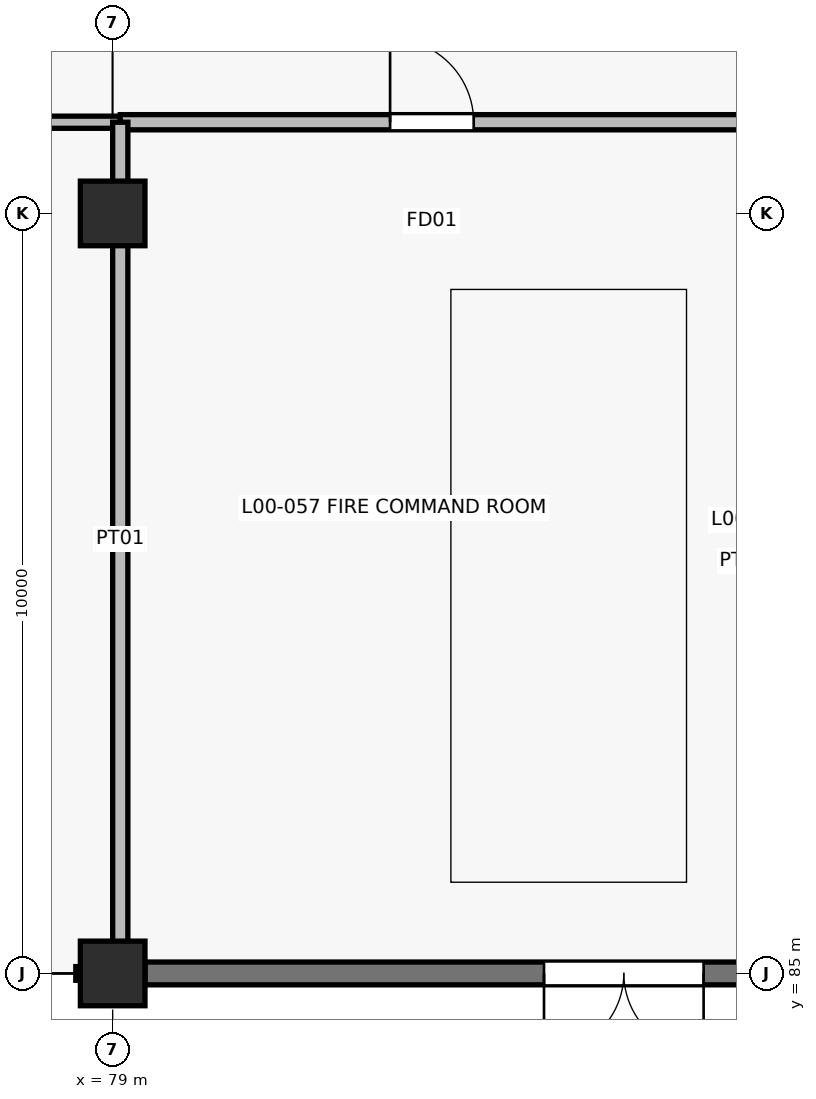
"""IFC4 building model, lengths in metres.
Left out: names, types, materials, properties, quantities, classifications, styles, units other than length and angle.
Written with IfcOpenShell. Run it as: python <this file> out.ifc"""

import sys

from ifc_helpers import new_model, si_unit, direction, frame, frame_2d, origin, origin_2d, place, context, subcontext, project, spatial, rectangle, extrude, element, fill, save


model = new_model("IFC4")
c1 = context("Model", 3, precision=1e-05, world=origin(), true_north=direction((0.0, 1.0)))
c2 = subcontext(c1, "Body", "Model", "MODEL_VIEW")
j1 = project(units=[si_unit("LENGTHUNIT", "METRE"), si_unit("PLANEANGLEUNIT", "RADIAN")], contexts=[c1])
p1 = place(None, origin())
s1 = spatial("IfcSite", under=j1, at=p1, CompositionType="ELEMENT")
p2 = place(p1, origin())
s2 = spatial("IfcBuilding", under=s1, at=p2, CompositionType="ELEMENT")
p3 = place(p2, origin())
s3 = spatial("IfcBuildingStorey", under=s2, at=p3, CompositionType="ELEMENT", Elevation=0.0)
for number, where, z_axis, x_axis in (
    (1, (79.0, 85.0, 0.0), (0.0, 0.0, 1.0), (1.0, 0.0, 0.0)),
    (2, (79.0, 95.0, 0.0), (0.0, 0.0, 1.0), (1.0, 0.0, 0.0)),
):
    element("IfcColumn", number, at=place(p3, frame(where, z_axis=z_axis, x_axis=x_axis)), inside=s3, PredefinedType="COLUMN", context=c2, shape_type="SweptSolid", body=[
        extrude(rectangle(XDim=0.85, YDim=0.85, at=origin_2d()), origin(), (0.0, 0.0, 1.0), 4.8),
    ])
p4 = place(p3, frame((90.575, 85.0, 0.0), z_axis=(0.0, 0.0, 1.0), x_axis=(-1.0, 0.0, 0.0)))
e3 = element("IfcWall", 3, at=p4, inside=s3, PredefinedType="SOLIDWALL", context=c2, shape_type="SweptSolid", body=[
    extrude(rectangle(XDim=11.15, YDim=0.3, at=frame_2d((5.575, 0.0))), origin(), (0.0, 0.0, 1.0), 4.8),
])
p5 = place(p4, frame((3.8, 0.0, 0.0)))
e4 = element("IfcOpeningElement", 4, at=p5, cuts=e3, PredefinedType="OPENING", context=c2, shape_type="SweptSolid", body=[
    extrude(rectangle(XDim=2.1, YDim=2.35, at=frame_2d((1.05, 1.175))), frame((0.0, 0.16, 0.0), z_axis=(0.0, -1.0, 0.0), x_axis=(1.0, 0.0, 0.0)), (0.0, 0.0, 1.0), 0.32),
])
p6 = place(p3, frame((43.18, 96.2, 0.0), z_axis=(0.0, 0.0, 1.0), x_axis=(1.0, 0.0, 0.0)))
e5 = element("IfcWall", 5, at=p6, inside=s3, PredefinedType="PARTITIONING", context=c2, shape_type="SweptSolid", body=[
    extrude(rectangle(XDim=35.92, YDim=0.16, at=frame_2d((17.96, 0.0))), origin(), (0.0, 0.0, 1.0), 3.525),
])
p7 = place(p6, frame((17.385, 0.0, 0.0)))
e6 = element("IfcOpeningElement", 6, at=p7, cuts=e5, PredefinedType="OPENING", context=c2, shape_type="SweptSolid", body=[
    extrude(rectangle(XDim=1.15, YDim=2.15, at=frame_2d((0.575, 1.075))), frame((0.0, 0.09, 0.0), z_axis=(0.0, -1.0, 0.0), x_axis=(1.0, 0.0, 0.0)), (0.0, 0.0, 1.0), 0.18),
])
p8 = place(p3, frame((79.1, 96.2, 0.0), z_axis=(0.0, 0.0, 1.0), x_axis=(1.0, 0.0, 0.0)))
e7 = element("IfcWall", 7, at=p8, inside=s3, PredefinedType="PARTITIONING", context=c2, shape_type="SweptSolid", body=[
    extrude(rectangle(XDim=8.2, YDim=0.2, at=frame_2d((4.1, 0.0))), origin(), (0.0, 0.0, 1.0), 3.525),
])
p9 = place(p8, frame((3.55, 0.0, 0.0)))
e8 = element("IfcOpeningElement", 8, at=p9, cuts=e7, PredefinedType="OPENING", context=c2, shape_type="SweptSolid", body=[
    extrude(rectangle(XDim=1.1, YDim=2.15, at=frame_2d((0.55, 1.075))), frame((0.0, 0.11, 0.0), z_axis=(0.0, -1.0, 0.0), x_axis=(1.0, 0.0, 0.0)), (0.0, 0.0, 1.0), 0.22),
])
p10 = place(p3, frame((79.1, 85.22, 0.0), z_axis=(0.0, 0.0, 1.0), x_axis=(0.0, 1.0, 0.0)))
e9 = element("IfcWall", 9, at=p10, inside=s3, PredefinedType="PARTITIONING", context=c2, shape_type="SweptSolid", body=[
    extrude(rectangle(XDim=10.98, YDim=0.2, at=frame_2d((5.49, 0.0))), origin(), (0.0, 0.0, 1.0), 3.525),
])
p11 = place(p5, origin())
e10 = element("IfcDoor", 10, at=p11, inside=s3, OperationType="DOUBLE_DOOR_SINGLE_SWING", PredefinedType="DOOR", context=c2, shape_type="SweptSolid", body=[
    extrude(rectangle(XDim=2.1, YDim=2.35, at=frame_2d((1.05, 1.175))), frame((0.0, 0.025, 0.0), z_axis=(0.0, -1.0, 0.0), x_axis=(1.0, 0.0, 0.0)), (0.0, 0.0, 1.0), 0.05),
])
fill(e4, e10)
p12 = place(p9, origin())
e11 = element("IfcDoor", 11, at=p12, inside=s3, OperationType="SINGLE_SWING_LEFT", PredefinedType="DOOR", context=c2, shape_type="SweptSolid", body=[
    extrude(rectangle(XDim=1.1, YDim=2.15, at=frame_2d((0.55, 1.075))), frame((0.0, 0.025, 0.0), z_axis=(0.0, -1.0, 0.0), x_axis=(1.0, 0.0, 0.0)), (0.0, 0.0, 1.0), 0.05),
])
fill(e8, e11)
save(model, sys.argv[1])
